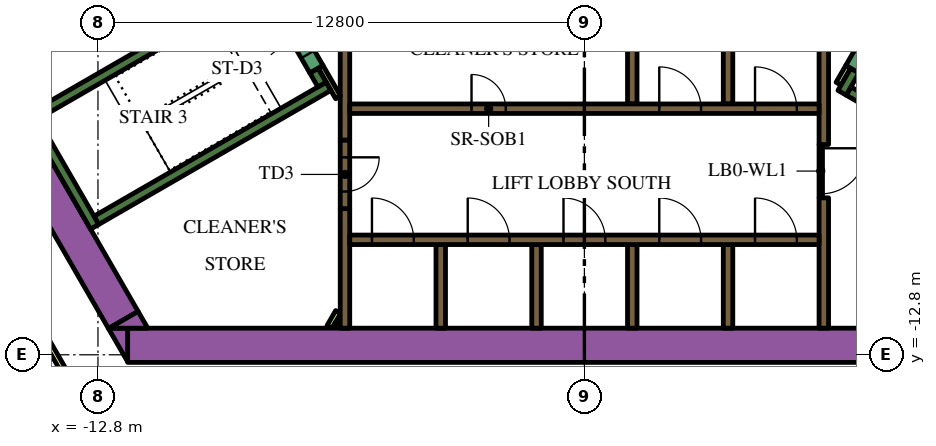
"""IFC4 building model, lengths in metres.
Left out: names, types, materials, properties, quantities, classifications, styles, units other than length and angle.
Written with IfcOpenShell. Run it as: python <this file> out.ifc"""

import sys

from ifc_helpers import new_model, si_unit, direction, frame, frame_2d, origin, place, context, subcontext, project, spatial, polyline, rectangle, outline, extrude, element, fill, save


model = new_model("IFC4")
c1 = context("Model", 3, precision=1e-05, world=origin(), true_north=direction((0.0, 1.0)))
c2 = subcontext(c1, "Body", "Model", "MODEL_VIEW")
j1 = project(units=[si_unit("LENGTHUNIT", "METRE"), si_unit("PLANEANGLEUNIT", "RADIAN")], contexts=[c1])
p1 = place(None, origin())
s1 = spatial("IfcSite", under=j1, at=p1, CompositionType="ELEMENT")
p2 = place(p1, origin())
s2 = spatial("IfcBuilding", under=s1, at=p2, CompositionType="ELEMENT")
p3 = place(p2, frame((0.0, 0.0, 27.6)))
s3 = spatial("IfcBuildingStorey", under=s2, at=p3, CompositionType="ELEMENT", Elevation=27.6)
p4 = place(p3, frame((-12.019, -12.55, 0.0), z_axis=(0.0, 0.0, 1.0), x_axis=(1.0, 0.0, 0.0)))
e1 = element("IfcWall", 1, at=p4, inside=s3, PredefinedType="SOLIDWALL", context=c2, shape_type="SweptSolid", body=[
    extrude(rectangle(XDim=21.63, YDim=0.9, at=frame_2d((10.815, 0.0))), origin(), (0.0, 0.0, 1.0), 3.9),
])
p5 = place(p3, origin())
e2 = element("IfcWall", 2, at=p5, inside=s3, PredefinedType="SOLIDWALL", context=c2, shape_type="SweptSolid", body=[
    extrude(outline(polyline([(-12.529, -12.1), (-12.021, -12.1), (-12.021, -12.98), (-12.529, -12.1)])), origin(), (0.0, 0.0, 1.0), 3.9),
])
p6 = place(p3, frame((-12.134, -11.883, 0.0), z_axis=(0.0, 0.0, 1.0), x_axis=(-0.500005339912, 0.866022320763, 0.0)))
e3 = element("IfcWall", 3, at=p6, inside=s3, PredefinedType="SOLIDWALL", context=c2, shape_type="SweptSolid", body=[
    extrude(rectangle(XDim=9.488, YDim=0.9, at=frame_2d((4.744, 0.0))), origin(), (0.0, 0.0, 1.0), 3.9),
])
e4 = element("IfcWall", 4, at=p5, inside=s3, PredefinedType="SOLIDWALL", context=c2, shape_type="SweptSolid", body=[
    extrude(outline(polyline([(-11.489, -12.1), (-12.505, -12.1), (-11.743, -11.66), (-11.489, -12.1)])), origin(), (0.0, 0.0, 1.0), 3.9),
])
p7 = place(p3, frame((12.84, -9.261, 0.0), z_axis=(0.0, 0.0, 1.0), x_axis=(-0.866013990052, 0.500019768644, 0.0)))
e5 = element("IfcWall", 5, at=p7, inside=s3, PredefinedType="SOLIDWALL", context=c2, shape_type="SweptSolid", body=[
    extrude(rectangle(XDim=6.8, YDim=0.25, at=frame_2d((3.4, 0.0))), origin(), (0.0, 0.0, 1.0), 3.9),
])
p8 = place(p3, frame((6.78, -5.906, 0.0), z_axis=(0.0, 0.0, 1.0), x_axis=(0.500223362819, 0.865896406789, 0.0)))
e6 = element("IfcWall", 6, at=p8, inside=s3, PredefinedType="SOLIDWALL", context=c2, shape_type="SweptSolid", body=[
    extrude(rectangle(XDim=0.675, YDim=0.25, at=frame_2d((0.337, 0.0))), origin(), (0.0, 0.0, 1.0), 3.9),
])
p9 = place(p3, frame((-12.885, -9.431, 0.0), z_axis=(0.0, 0.0, 1.0), x_axis=(-0.500020560727, 0.866013532718, 0.0)))
e7 = element("IfcWall", 7, at=p9, inside=s3, PredefinedType="SOLIDWALL", context=c2, shape_type="SweptSolid", body=[
    extrude(rectangle(XDim=3.45, YDim=0.25, at=frame_2d((1.725, 0.0))), origin(), (0.0, 0.0, 1.0), 3.9),
])
p10 = place(p3, frame((-14.44, -6.49, 0.0), z_axis=(0.0, 0.0, 1.0), x_axis=(0.866022966069, 0.500004222222, 0.0)))
e8 = element("IfcWall", 8, at=p10, inside=s3, PredefinedType="SOLIDWALL", context=c2, shape_type="SweptSolid", body=[
    extrude(rectangle(XDim=6.8, YDim=0.25, at=frame_2d((3.4, 0.0))), origin(), (0.0, 0.0, 1.0), 3.9),
])
p11 = place(p3, frame((-12.84, -9.261, 0.0), z_axis=(0.0, 0.0, 1.0), x_axis=(0.866016039709, 0.500016218704, 0.0)))
e9 = element("IfcWall", 9, at=p11, inside=s3, PredefinedType="SOLIDWALL", context=c2, shape_type="SweptSolid", body=[
    extrude(rectangle(XDim=7.05, YDim=0.25, at=frame_2d((3.525, 0.0))), origin(), (0.0, 0.0, 1.0), 3.9),
])
p12 = place(p3, frame((-6.905, -5.69, 0.0), z_axis=(0.0, 0.0, 1.0), x_axis=(-0.500402024738, 0.865793170242, 0.0)))
e10 = element("IfcWall", 10, at=p12, inside=s3, PredefinedType="SOLIDWALL", context=c2, shape_type="SweptSolid", body=[
    extrude(rectangle(XDim=0.425, YDim=0.25, at=frame_2d((0.212, 0.0))), origin(), (0.0, 0.0, 1.0), 3.9),
])
p13 = place(p3, frame((-3.78, -12.1, 0.0), z_axis=(0.0, 0.0, 1.0), x_axis=(0.0, 1.0, 0.0)))
e11 = element("IfcWall", 11, at=p13, inside=s3, PredefinedType="SOLIDWALL", context=c2, shape_type="SweptSolid", body=[
    extrude(rectangle(XDim=2.2, YDim=0.25, at=frame_2d((1.1, 0.0))), origin(), (0.0, 0.0, 1.0), 3.9),
])
p14 = place(p3, frame((-6.3, -12.1, 0.0), z_axis=(0.0, 0.0, 1.0), x_axis=(0.0, 1.0, 0.0)))
e12 = element("IfcWall", 12, at=p14, inside=s3, PredefinedType="SOLIDWALL", context=c2, shape_type="SweptSolid", body=[
    extrude(rectangle(XDim=3.146, YDim=0.25, at=frame_2d((1.573, 0.0))), origin(), (0.0, 0.0, 1.0), 3.9),
])
p15 = place(p3, frame((6.3, -8.67, 0.0), z_axis=(0.0, 0.0, 1.0), x_axis=(0.0, -1.0, 0.0)))
e13 = element("IfcWall", 13, at=p15, inside=s3, PredefinedType="SOLIDWALL", context=c2, shape_type="SweptSolid", body=[
    extrude(rectangle(XDim=3.43, YDim=0.25, at=frame_2d((1.715, 0.0))), origin(), (0.0, 0.0, 1.0), 3.9),
])
p16 = place(p3, frame((6.3, -7.268, 0.0), z_axis=(0.0, 0.0, 1.0), x_axis=(0.0, 1.0, 0.0)))
e14 = element("IfcWall", 14, at=p16, inside=s3, PredefinedType="SOLIDWALL", context=c2, shape_type="SweptSolid", body=[
    extrude(rectangle(XDim=3.268, YDim=0.25, at=frame_2d((1.634, 0.0))), origin(), (0.0, 0.0, 1.0), 3.9),
])
for number, where, z_axis, x_axis in (
    (15, (3.78, -4.0, 0.0), (0.0, 0.0, 1.0), (0.0, -1.0, 0.0)),
    (16, (1.26, -4.0, 0.0), (0.0, 0.0, 1.0), (0.0, -1.0, 0.0)),
):
    element("IfcWall", number, at=place(p3, frame(where, z_axis=z_axis, x_axis=x_axis)), inside=s3, PredefinedType="SOLIDWALL", context=c2, shape_type="SweptSolid", body=[
        extrude(rectangle(XDim=2.2, YDim=0.25, at=frame_2d((1.1, 0.0))), origin(), (0.0, 0.0, 1.0), 3.9),
    ])
p17 = place(p3, frame((-6.3, -4.0, 0.0), z_axis=(0.0, 0.0, 1.0), x_axis=(0.0, -1.0, 0.0)))
e17 = element("IfcWall", 17, at=p17, inside=s3, PredefinedType="SOLIDWALL", context=c2, shape_type="SweptSolid", body=[
    extrude(rectangle(XDim=3.154, YDim=0.25, at=frame_2d((1.577, 0.0))), origin(), (0.0, 0.0, 1.0), 3.9),
])
for number, where, z_axis, x_axis in (
    (18, (3.78, -12.1, 0.0), (0.0, 0.0, 1.0), (0.0, 1.0, 0.0)),
    (19, (1.26, -12.1, 0.0), (0.0, 0.0, 1.0), (0.0, 1.0, 0.0)),
    (20, (-1.26, -12.1, 0.0), (0.0, 0.0, 1.0), (0.0, 1.0, 0.0)),
):
    element("IfcWall", number, at=place(p3, frame(where, z_axis=z_axis, x_axis=x_axis)), inside=s3, PredefinedType="SOLIDWALL", context=c2, shape_type="SweptSolid", body=[
        extrude(rectangle(XDim=2.2, YDim=0.25, at=frame_2d((1.1, 0.0))), origin(), (0.0, 0.0, 1.0), 3.9),
    ])
p18 = place(p3, frame((-6.708, -12.068, 0.0), z_axis=(0.0, 0.0, 1.0), x_axis=(0.500000789788, 0.8660249478, 0.0)))
e21 = element("IfcWall", 21, at=p18, inside=s3, PredefinedType="PARTITIONING", context=c2, shape_type="SweptSolid", body=[
    extrude(rectangle(XDim=0.456, YDim=0.15, at=frame_2d((0.228, 0.0))), origin(), (0.0, 0.0, 1.0), 2.75),
])
p19 = place(p3, frame((-6.534, -12.068, 0.0), z_axis=(0.0, 0.0, 1.0), x_axis=(0.500240224089, 0.865886665912, 0.0)))
e22 = element("IfcWall", 22, at=p19, inside=s3, PredefinedType="PARTITIONING", context=c2, shape_type="SweptSolid", body=[
    extrude(rectangle(XDim=0.109, YDim=0.15, at=frame_2d((0.054, 0.0))), origin(), (0.0, 0.0, 1.0), 2.75),
])
p20 = place(p3, frame((-6.48, -6.027, 0.0), z_axis=(0.0, 0.0, 1.0), x_axis=(-0.499927229454, 0.866067413802, 0.0)))
e23 = element("IfcWall", 23, at=p20, inside=s3, PredefinedType="PARTITIONING", context=c2, shape_type="SweptSolid", body=[
    extrude(rectangle(XDim=0.929, YDim=0.15, at=frame_2d((0.464, 0.0))), origin(), (0.0, 0.0, 1.0), 3.9),
])
p21 = place(p3, frame((6.945, -5.222, 0.0), z_axis=(0.0, 0.0, 1.0), x_axis=(-0.499818422106, -0.866130212453, 0.0)))
e24 = element("IfcWall", 24, at=p21, inside=s3, PredefinedType="PARTITIONING", context=c2, shape_type="SweptSolid", body=[
    extrude(rectangle(XDim=0.514, YDim=0.15, at=frame_2d((0.257, 0.0))), origin(), (0.0, 0.0, 1.0), 2.75),
])
p22 = place(p3, frame((-6.175, -9.775, 0.0), z_axis=(0.0, 0.0, 1.0), x_axis=(1.0, 0.0, 0.0)))
e25 = element("IfcWall", 25, at=p22, inside=s3, PredefinedType="SOLIDWALL", context=c2, shape_type="SweptSolid", body=[
    extrude(rectangle(XDim=12.35, YDim=0.25, at=frame_2d((6.175, 0.0))), origin(), (0.0, 0.0, 1.0), 3.9),
])
p23 = place(p22, frame((0.585, 0.0, 0.0)))
e26 = element("IfcOpeningElement", 26, at=p23, cuts=e25, PredefinedType="OPENING", context=c2, shape_type="SweptSolid", body=[
    extrude(rectangle(XDim=1.1, YDim=2.1, at=frame_2d((0.55, 1.05))), frame((0.0, 0.135, 0.0), z_axis=(0.0, -1.0, 0.0), x_axis=(1.0, 0.0, 0.0)), (0.0, 0.0, 1.0), 0.27),
])
p24 = place(p22, frame((3.105, 0.0, 0.0)))
e27 = element("IfcOpeningElement", 27, at=p24, cuts=e25, PredefinedType="OPENING", context=c2, shape_type="SweptSolid", body=[
    extrude(rectangle(XDim=1.1, YDim=2.1, at=frame_2d((0.55, 1.05))), frame((0.0, 0.135, 0.0), z_axis=(0.0, -1.0, 0.0), x_axis=(1.0, 0.0, 0.0)), (0.0, 0.0, 1.0), 0.27),
])
p25 = place(p22, frame((5.625, 0.0, 0.0)))
e28 = element("IfcOpeningElement", 28, at=p25, cuts=e25, PredefinedType="OPENING", context=c2, shape_type="SweptSolid", body=[
    extrude(rectangle(XDim=1.1, YDim=2.1, at=frame_2d((0.55, 1.05))), frame((0.0, 0.135, 0.0), z_axis=(0.0, -1.0, 0.0), x_axis=(1.0, 0.0, 0.0)), (0.0, 0.0, 1.0), 0.27),
])
p26 = place(p22, frame((8.145, 0.0, 0.0)))
e29 = element("IfcOpeningElement", 29, at=p26, cuts=e25, PredefinedType="OPENING", context=c2, shape_type="SweptSolid", body=[
    extrude(rectangle(XDim=1.1, YDim=2.1, at=frame_2d((0.55, 1.05))), frame((0.0, 0.135, 0.0), z_axis=(0.0, -1.0, 0.0), x_axis=(1.0, 0.0, 0.0)), (0.0, 0.0, 1.0), 0.27),
])
p27 = place(p22, frame((10.665, 0.0, 0.0)))
e30 = element("IfcOpeningElement", 30, at=p27, cuts=e25, PredefinedType="OPENING", context=c2, shape_type="SweptSolid", body=[
    extrude(rectangle(XDim=1.1, YDim=2.1, at=frame_2d((0.55, 1.05))), frame((0.0, 0.135, 0.0), z_axis=(0.0, -1.0, 0.0), x_axis=(1.0, 0.0, 0.0)), (0.0, 0.0, 1.0), 0.27),
])
p28 = place(p3, frame((-6.175, -6.325, 0.0), z_axis=(0.0, 0.0, 1.0), x_axis=(1.0, 0.0, 0.0)))
e31 = element("IfcWall", 31, at=p28, inside=s3, PredefinedType="SOLIDWALL", context=c2, shape_type="SweptSolid", body=[
    extrude(rectangle(XDim=12.35, YDim=0.25, at=frame_2d((6.175, 0.0))), origin(), (0.0, 0.0, 1.0), 3.9),
])
p29 = place(p28, frame((3.205, 0.0, 0.0)))
e32 = element("IfcOpeningElement", 32, at=p29, cuts=e31, PredefinedType="OPENING", context=c2, shape_type="SweptSolid", body=[
    extrude(rectangle(XDim=0.9, YDim=2.1, at=frame_2d((0.45, 1.05))), frame((0.0, 0.135, 0.0), z_axis=(0.0, -1.0, 0.0), x_axis=(1.0, 0.0, 0.0)), (0.0, 0.0, 1.0), 0.27),
])
p30 = place(p28, frame((8.145, 0.0, 0.0)))
e33 = element("IfcOpeningElement", 33, at=p30, cuts=e31, PredefinedType="OPENING", context=c2, shape_type="SweptSolid", body=[
    extrude(rectangle(XDim=1.1, YDim=2.1, at=frame_2d((0.55, 1.05))), frame((0.0, 0.135, 0.0), z_axis=(0.0, -1.0, 0.0), x_axis=(1.0, 0.0, 0.0)), (0.0, 0.0, 1.0), 0.27),
])
p31 = place(p28, frame((10.665, 0.0, 0.0)))
e34 = element("IfcOpeningElement", 34, at=p31, cuts=e31, PredefinedType="OPENING", context=c2, shape_type="SweptSolid", body=[
    extrude(rectangle(XDim=1.1, YDim=2.1, at=frame_2d((0.55, 1.05))), frame((0.0, 0.135, 0.0), z_axis=(0.0, -1.0, 0.0), x_axis=(1.0, 0.0, 0.0)), (0.0, 0.0, 1.0), 0.27),
])
p32 = place(p3, frame((7.053, -5.284, 0.0), z_axis=(0.0, 0.0, 1.0), x_axis=(0.500078061341, 0.865980330357, 0.0)))
e35 = element("IfcWall", 35, at=p32, inside=s3, PredefinedType="SOLIDWALL", context=c2, shape_type="SweptSolid", body=[
    extrude(rectangle(XDim=2.1, YDim=0.4, at=frame_2d((1.05, 0.0))), origin(), (0.0, 0.0, 1.0), 3.9),
])
p33 = place(p32, frame((0.45, 0.0, 0.0)))
e36 = element("IfcOpeningElement", 36, at=p33, cuts=e35, PredefinedType="OPENING", context=c2, shape_type="SweptSolid", body=[
    extrude(rectangle(XDim=1.2, YDim=2.1, at=frame_2d((0.6, 1.05))), frame((0.0, 0.21, 0.0), z_axis=(0.0, -1.0, 0.0), x_axis=(1.0, 0.0, 0.0)), (0.0, 0.0, 1.0), 0.42),
])
p34 = place(p3, frame((-8.103, -3.466, 0.0), z_axis=(0.0, 0.0, 1.0), x_axis=(0.500078061341, -0.865980330357, 0.0)))
e37 = element("IfcWall", 37, at=p34, inside=s3, PredefinedType="SOLIDWALL", context=c2, shape_type="SweptSolid", body=[
    extrude(rectangle(XDim=2.1, YDim=0.4, at=frame_2d((1.05, 0.0))), origin(), (0.0, 0.0, 1.0), 3.9),
])
p35 = place(p34, frame((0.45, 0.0, 0.0)))
e38 = element("IfcOpeningElement", 38, at=p35, cuts=e37, PredefinedType="OPENING", context=c2, shape_type="SweptSolid", body=[
    extrude(rectangle(XDim=1.2, YDim=2.1, at=frame_2d((0.6, 1.05))), frame((0.0, 0.21, 0.0), z_axis=(0.0, -1.0, 0.0), x_axis=(1.0, 0.0, 0.0)), (0.0, 0.0, 1.0), 0.42),
])
p36 = place(p3, frame((-6.3, -7.154, 0.0), z_axis=(0.0, 0.0, 1.0), x_axis=(0.0, -1.0, 0.0)))
e39 = element("IfcWall", 39, at=p36, inside=s3, PredefinedType="SOLIDWALL", context=c2, shape_type="SweptSolid", body=[
    extrude(rectangle(XDim=1.8, YDim=0.25, at=frame_2d((0.9, 0.0))), origin(), (0.0, 0.0, 1.0), 3.9),
])
p37 = place(p36, frame((0.45, 0.0, 0.0)))
e40 = element("IfcOpeningElement", 40, at=p37, cuts=e39, PredefinedType="OPENING", context=c2, shape_type="SweptSolid", body=[
    extrude(rectangle(XDim=0.9, YDim=2.1, at=frame_2d((0.45, 1.05))), frame((0.0, 0.135, 0.0), z_axis=(0.0, -1.0, 0.0), x_axis=(1.0, 0.0, 0.0)), (0.0, 0.0, 1.0), 0.27),
])
p38 = place(p3, frame((6.22, -7.266, 0.0), z_axis=(0.0, 0.0, 1.0), x_axis=(0.0, -1.0, 0.0)))
e41 = element("IfcWall", 41, at=p38, inside=s3, PredefinedType="PARTITIONING", context=c2, shape_type="SweptSolid", body=[
    extrude(rectangle(XDim=1.4, YDim=0.09, at=frame_2d((0.7, 0.0))), origin(), (0.0, 0.0, 1.0), 2.75),
])
p39 = place(p38, frame((0.1, 0.0, 0.0)))
e42 = element("IfcOpeningElement", 42, at=p39, cuts=e41, PredefinedType="OPENING", context=c2, shape_type="SweptSolid", body=[
    extrude(rectangle(XDim=1.2, YDim=2.1, at=frame_2d((0.6, 1.05))), frame((0.0, 0.055, 0.0), z_axis=(0.0, -1.0, 0.0), x_axis=(1.0, 0.0, 0.0)), (0.0, 0.0, 1.0), 0.11),
])
p40 = place(p3, frame((-12.918, -14.575, 0.0), z_axis=(0.0, 0.0, 1.0), x_axis=(-0.500009150678, 0.866020120573, 0.0)))
e43 = element("IfcWall", 43, at=p40, inside=s3, PredefinedType="PARTITIONING", context=c2, shape_type="SweptSolid", body=[
    extrude(rectangle(XDim=5.258, YDim=0.15, at=frame_2d((2.629, 0.0))), origin(), (0.0, 0.0, 1.0), 2.75),
])
p41 = place(p23, origin())
e44 = element("IfcDoor", 44, at=p41, inside=s3, OperationType="DOUBLE_DOOR_SLIDING", PredefinedType="DOOR", context=c2, shape_type="SweptSolid", body=[
    extrude(rectangle(XDim=1.1, YDim=2.1, at=frame_2d((0.55, 1.05))), frame((0.0, 0.025, 0.0), z_axis=(0.0, -1.0, 0.0), x_axis=(1.0, 0.0, 0.0)), (0.0, 0.0, 1.0), 0.05),
])
fill(e26, e44)
p42 = place(p24, origin())
e45 = element("IfcDoor", 45, at=p42, inside=s3, OperationType="DOUBLE_DOOR_SLIDING", PredefinedType="DOOR", context=c2, shape_type="SweptSolid", body=[
    extrude(rectangle(XDim=1.1, YDim=2.1, at=frame_2d((0.55, 1.05))), frame((0.0, 0.025, 0.0), z_axis=(0.0, -1.0, 0.0), x_axis=(1.0, 0.0, 0.0)), (0.0, 0.0, 1.0), 0.05),
])
fill(e27, e45)
p43 = place(p25, origin())
e46 = element("IfcDoor", 46, at=p43, inside=s3, OperationType="DOUBLE_DOOR_SLIDING", PredefinedType="DOOR", context=c2, shape_type="SweptSolid", body=[
    extrude(rectangle(XDim=1.1, YDim=2.1, at=frame_2d((0.55, 1.05))), frame((0.0, 0.025, 0.0), z_axis=(0.0, -1.0, 0.0), x_axis=(1.0, 0.0, 0.0)), (0.0, 0.0, 1.0), 0.05),
])
fill(e28, e46)
p44 = place(p26, origin())
e47 = element("IfcDoor", 47, at=p44, inside=s3, OperationType="DOUBLE_DOOR_SLIDING", PredefinedType="DOOR", context=c2, shape_type="SweptSolid", body=[
    extrude(rectangle(XDim=1.1, YDim=2.1, at=frame_2d((0.55, 1.05))), frame((0.0, 0.025, 0.0), z_axis=(0.0, -1.0, 0.0), x_axis=(1.0, 0.0, 0.0)), (0.0, 0.0, 1.0), 0.05),
])
fill(e29, e47)
p45 = place(p27, origin())
e48 = element("IfcDoor", 48, at=p45, inside=s3, OperationType="DOUBLE_DOOR_SLIDING", PredefinedType="DOOR", context=c2, shape_type="SweptSolid", body=[
    extrude(rectangle(XDim=1.1, YDim=2.1, at=frame_2d((0.55, 1.05))), frame((0.0, 0.025, 0.0), z_axis=(0.0, -1.0, 0.0), x_axis=(1.0, 0.0, 0.0)), (0.0, 0.0, 1.0), 0.05),
])
fill(e30, e48)
p46 = place(p29, origin())
e49 = element("IfcDoor", 49, at=p46, inside=s3, OperationType="SINGLE_SWING_LEFT", PredefinedType="DOOR", context=c2, shape_type="SweptSolid", body=[
    extrude(rectangle(XDim=0.9, YDim=2.1, at=frame_2d((0.45, 1.05))), frame((0.0, 0.025, 0.0), z_axis=(0.0, -1.0, 0.0), x_axis=(1.0, 0.0, 0.0)), (0.0, 0.0, 1.0), 0.05),
])
fill(e32, e49)
p47 = place(p30, origin())
e50 = element("IfcDoor", 50, at=p47, inside=s3, OperationType="DOUBLE_DOOR_SLIDING", PredefinedType="DOOR", context=c2, shape_type="SweptSolid", body=[
    extrude(rectangle(XDim=1.1, YDim=2.1, at=frame_2d((0.55, 1.05))), frame((0.0, 0.025, 0.0), z_axis=(0.0, -1.0, 0.0), x_axis=(1.0, 0.0, 0.0)), (0.0, 0.0, 1.0), 0.05),
])
fill(e33, e50)
p48 = place(p31, origin())
e51 = element("IfcDoor", 51, at=p48, inside=s3, OperationType="DOUBLE_DOOR_SLIDING", PredefinedType="DOOR", context=c2, shape_type="SweptSolid", body=[
    extrude(rectangle(XDim=1.1, YDim=2.1, at=frame_2d((0.55, 1.05))), frame((0.0, 0.025, 0.0), z_axis=(0.0, -1.0, 0.0), x_axis=(1.0, 0.0, 0.0)), (0.0, 0.0, 1.0), 0.05),
])
fill(e34, e51)
p49 = place(p35, origin())
e52 = element("IfcDoor", 52, at=p49, inside=s3, OperationType="SINGLE_SWING_LEFT", PredefinedType="DOOR", context=c2, shape_type="SweptSolid", body=[
    extrude(rectangle(XDim=1.2, YDim=2.1, at=frame_2d((0.6, 1.05))), frame((0.0, 0.025, 0.0), z_axis=(0.0, -1.0, 0.0), x_axis=(1.0, 0.0, 0.0)), (0.0, 0.0, 1.0), 0.05),
])
fill(e38, e52)
p50 = place(p37, origin())
e53 = element("IfcDoor", 53, at=p50, inside=s3, OperationType="SINGLE_SWING_LEFT", PredefinedType="DOOR", context=c2, shape_type="SweptSolid", body=[
    extrude(rectangle(XDim=0.9, YDim=2.1, at=frame_2d((0.45, 1.05))), frame((0.0, 0.025, 0.0), z_axis=(0.0, -1.0, 0.0), x_axis=(1.0, 0.0, 0.0)), (0.0, 0.0, 1.0), 0.05),
])
fill(e40, e53)
p51 = place(p39, origin())
e54 = element("IfcDoor", 54, at=p51, inside=s3, OperationType="SINGLE_SWING_LEFT", PredefinedType="DOOR", context=c2, shape_type="SweptSolid", body=[
    extrude(rectangle(XDim=1.2, YDim=2.1, at=frame_2d((0.6, 1.05))), frame((0.0, 0.025, 0.0), z_axis=(0.0, -1.0, 0.0), x_axis=(1.0, 0.0, 0.0)), (0.0, 0.0, 1.0), 0.05),
])
fill(e42, e54)
save(model, sys.argv[1])
